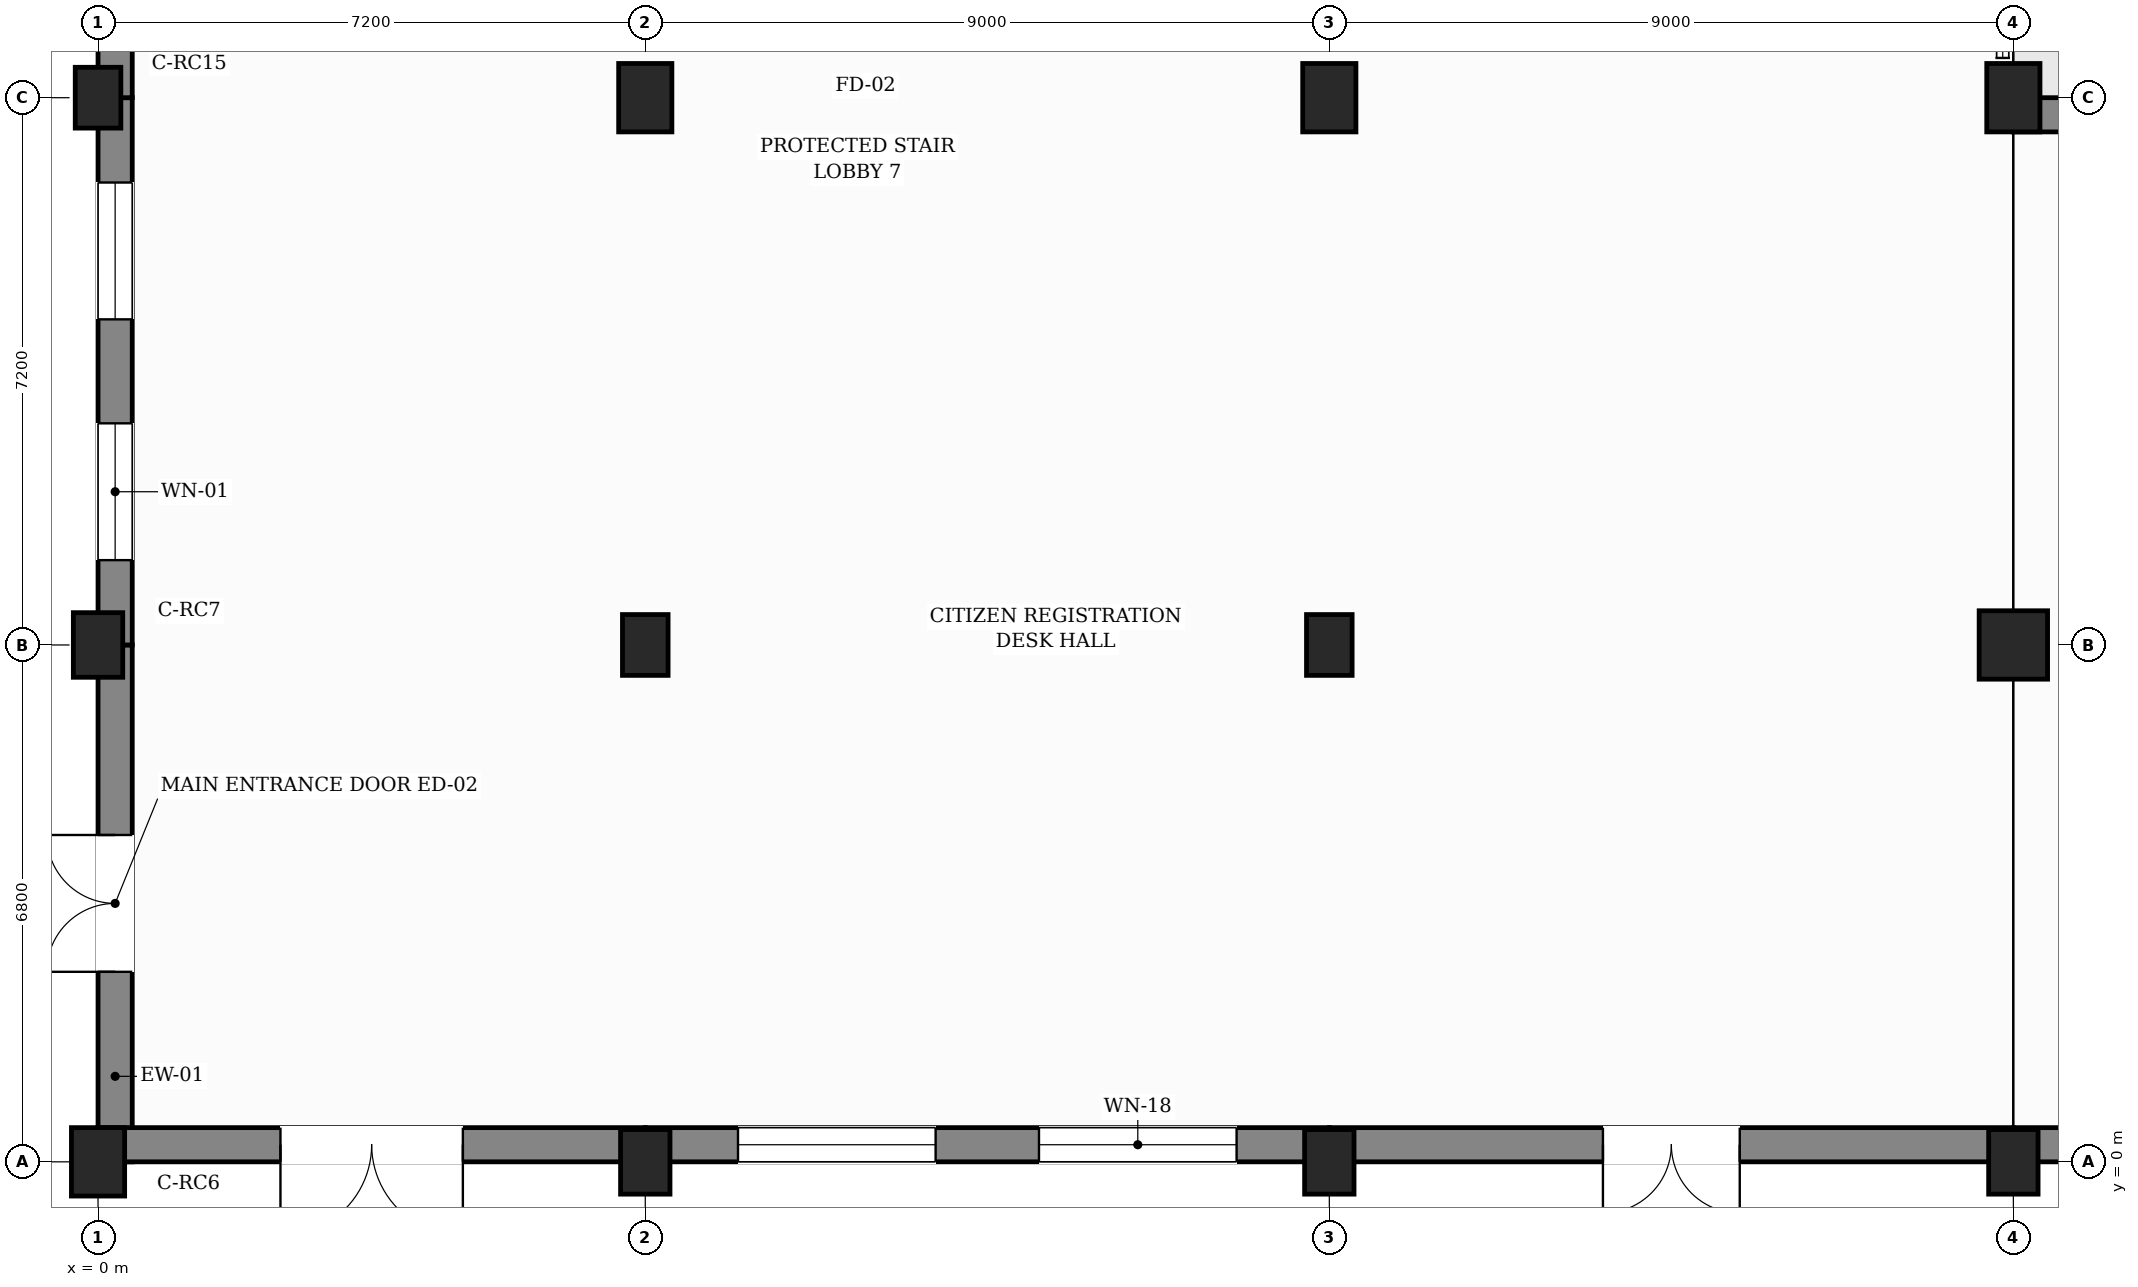
"""IFC4 building model, lengths in metres.
Left out: names, types, materials, properties, quantities, classifications, styles, units other than length and angle.
Written with IfcOpenShell. Run it as: python <this file> out.ifc"""

import sys

from ifc_helpers import new_model, si_unit, direction, frame, frame_2d, origin, origin_with_axes, origin_2d, place, context, subcontext, project, spatial, rectangle, extrude, element, fill, save


model = new_model("IFC4")
c1 = context("Model", 3, precision=1e-05, world=origin(), true_north=direction((0.0, 1.0)))
c2 = subcontext(c1, "Body", "Model", "MODEL_VIEW")
j1 = project(units=[si_unit("LENGTHUNIT", "METRE"), si_unit("PLANEANGLEUNIT", "RADIAN")], contexts=[c1])
p1 = place(None, origin())
s1 = spatial("IfcSite", under=j1, at=p1, CompositionType="ELEMENT")
p2 = place(p1, origin())
s2 = spatial("IfcBuilding", under=s1, at=p2, CompositionType="ELEMENT")
p3 = place(p2, origin())
s3 = spatial("IfcBuildingStorey", under=s2, at=p3, CompositionType="ELEMENT", Elevation=0.0)
p4 = place(p3, origin_with_axes())
e1 = element("IfcColumn", 1, at=p4, inside=s3, PredefinedType="COLUMN", context=c2, shape_type="SweptSolid", body=[
    extrude(rectangle(XDim=0.7, YDim=0.9, at=origin_2d()), origin(), (0.0, 0.0, 1.0), 5.1),
])
p5 = place(p3, frame((0.0, 6.8, 0.0), z_axis=(0.0, 0.0, 1.0), x_axis=(1.0, 0.0, 0.0)))
e2 = element("IfcColumn", 2, at=p5, inside=s3, PredefinedType="COLUMN", context=c2, shape_type="SweptSolid", body=[
    extrude(rectangle(XDim=0.65, YDim=0.85, at=origin_2d()), origin(), (0.0, 0.0, 1.0), 5.1),
])
p6 = place(p3, frame((0.0, 14.0, 0.0), z_axis=(0.0, 0.0, 1.0), x_axis=(1.0, 0.0, 0.0)))
e3 = element("IfcColumn", 3, at=p6, inside=s3, PredefinedType="COLUMN", context=c2, shape_type="SweptSolid", body=[
    extrude(rectangle(XDim=0.6, YDim=0.8, at=origin_2d()), origin(), (0.0, 0.0, 1.0), 5.1),
])
p7 = place(p3, frame((7.2, 0.0, 0.0), z_axis=(0.0, 0.0, 1.0), x_axis=(1.0, 0.0, 0.0)))
e4 = element("IfcColumn", 4, at=p7, inside=s3, PredefinedType="COLUMN", context=c2, shape_type="SweptSolid", body=[
    extrude(rectangle(XDim=0.65, YDim=0.85, at=origin_2d()), origin(), (0.0, 0.0, 1.0), 5.1),
])
p8 = place(p3, frame((7.2, 6.8, 0.0), z_axis=(0.0, 0.0, 1.0), x_axis=(1.0, 0.0, 0.0)))
e5 = element("IfcColumn", 5, at=p8, inside=s3, PredefinedType="COLUMN", context=c2, shape_type="SweptSolid", body=[
    extrude(rectangle(XDim=0.6, YDim=0.8, at=origin_2d()), origin(), (0.0, 0.0, 1.0), 5.1),
])
p9 = place(p3, frame((7.2, 14.0, 0.0), z_axis=(0.0, 0.0, 1.0), x_axis=(1.0, 0.0, 0.0)))
e6 = element("IfcColumn", 6, at=p9, inside=s3, PredefinedType="COLUMN", context=c2, shape_type="SweptSolid", body=[
    extrude(rectangle(XDim=0.7, YDim=0.9, at=origin_2d()), origin(), (0.0, 0.0, 1.0), 5.1),
])
p10 = place(p3, frame((16.2, 0.0, 0.0), z_axis=(0.0, 0.0, 1.0), x_axis=(1.0, 0.0, 0.0)))
e7 = element("IfcColumn", 7, at=p10, inside=s3, PredefinedType="COLUMN", context=c2, shape_type="SweptSolid", body=[
    extrude(rectangle(XDim=0.65, YDim=0.85, at=origin_2d()), origin(), (0.0, 0.0, 1.0), 5.1),
])
p11 = place(p3, frame((16.2, 6.8, 0.0), z_axis=(0.0, 0.0, 1.0), x_axis=(1.0, 0.0, 0.0)))
e8 = element("IfcColumn", 8, at=p11, inside=s3, PredefinedType="COLUMN", context=c2, shape_type="SweptSolid", body=[
    extrude(rectangle(XDim=0.6, YDim=0.8, at=origin_2d()), origin(), (0.0, 0.0, 1.0), 5.1),
])
p12 = place(p3, frame((16.2, 14.0, 0.0), z_axis=(0.0, 0.0, 1.0), x_axis=(1.0, 0.0, 0.0)))
e9 = element("IfcColumn", 9, at=p12, inside=s3, PredefinedType="COLUMN", context=c2, shape_type="SweptSolid", body=[
    extrude(rectangle(XDim=0.7, YDim=0.9, at=origin_2d()), origin(), (0.0, 0.0, 1.0), 5.1),
])
p13 = place(p3, frame((25.2, 0.0, 0.0), z_axis=(0.0, 0.0, 1.0), x_axis=(1.0, 0.0, 0.0)))
e10 = element("IfcColumn", 10, at=p13, inside=s3, PredefinedType="COLUMN", context=c2, shape_type="SweptSolid", body=[
    extrude(rectangle(XDim=0.65, YDim=0.85, at=origin_2d()), origin(), (0.0, 0.0, 1.0), 5.1),
])
p14 = place(p3, frame((25.2, 6.8, 0.0), z_axis=(0.0, 0.0, 1.0), x_axis=(1.0, 0.0, 0.0)))
e11 = element("IfcColumn", 11, at=p14, inside=s3, PredefinedType="COLUMN", context=c2, shape_type="SweptSolid", body=[
    extrude(rectangle(XDim=0.9, YDim=0.9, at=origin_2d()), origin(), (0.0, 0.0, 1.0), 5.1),
])
p15 = place(p3, frame((25.2, 14.0, 0.0), z_axis=(0.0, 0.0, 1.0), x_axis=(1.0, 0.0, 0.0)))
e12 = element("IfcColumn", 12, at=p15, inside=s3, PredefinedType="COLUMN", context=c2, shape_type="SweptSolid", body=[
    extrude(rectangle(XDim=0.7, YDim=0.9, at=origin_2d()), origin(), (0.0, 0.0, 1.0), 5.1),
])
p16 = place(p3, frame((0.225, 0.0, 0.0), z_axis=(0.0, 0.0, 1.0), x_axis=(0.0, 1.0, 0.0)))
e13 = element("IfcWall", 13, at=p16, inside=s3, PredefinedType="SOLIDWALL", context=c2, shape_type="SweptSolid", body=[
    extrude(rectangle(XDim=6.8, YDim=0.45, at=frame_2d((3.4, 0.0))), origin(), (0.0, 0.0, 1.0), 4.78),
])
p17 = place(p16, frame((2.5, 0.0, 0.0)))
e14 = element("IfcOpeningElement", 14, at=p17, cuts=e13, PredefinedType="OPENING", context=c2, shape_type="SweptSolid", body=[
    extrude(rectangle(XDim=1.8, YDim=2.4, at=frame_2d((0.9, 1.2))), frame((0.0, 0.235, 0.0), z_axis=(0.0, -1.0, 0.0), x_axis=(1.0, 0.0, 0.0)), (0.0, 0.0, 1.0), 0.47),
])
p18 = place(p3, frame((0.225, 6.8, 0.0), z_axis=(0.0, 0.0, 1.0), x_axis=(0.0, 1.0, 0.0)))
e15 = element("IfcWall", 15, at=p18, inside=s3, PredefinedType="SOLIDWALL", context=c2, shape_type="SweptSolid", body=[
    extrude(rectangle(XDim=7.2, YDim=0.45, at=frame_2d((3.6, 0.0))), origin(), (0.0, 0.0, 1.0), 4.78),
])
p19 = place(p18, frame((1.116, 0.0, 0.85)))
e16 = element("IfcOpeningElement", 16, at=p19, cuts=e15, PredefinedType="OPENING", context=c2, shape_type="SweptSolid", body=[
    extrude(rectangle(XDim=1.8, YDim=2.8, at=frame_2d((0.9, 1.4))), frame((0.0, 0.235, 0.0), z_axis=(0.0, -1.0, 0.0), x_axis=(1.0, 0.0, 0.0)), (0.0, 0.0, 1.0), 0.47),
])
p20 = place(p18, frame((4.284, 0.0, 0.85)))
e17 = element("IfcOpeningElement", 17, at=p20, cuts=e15, PredefinedType="OPENING", context=c2, shape_type="SweptSolid", body=[
    extrude(rectangle(XDim=1.8, YDim=2.8, at=frame_2d((0.9, 1.4))), frame((0.0, 0.235, 0.0), z_axis=(0.0, -1.0, 0.0), x_axis=(1.0, 0.0, 0.0)), (0.0, 0.0, 1.0), 0.47),
])
p21 = place(p3, frame((0.225, 14.0, 0.0), z_axis=(0.0, 0.0, 1.0), x_axis=(0.0, 1.0, 0.0)))
e18 = element("IfcWall", 18, at=p21, inside=s3, PredefinedType="SOLIDWALL", context=c2, shape_type="SweptSolid", body=[
    extrude(rectangle(XDim=9.0, YDim=0.45, at=frame_2d((4.5, 0.0))), origin(), (0.0, 0.0, 1.0), 4.78),
])
p22 = place(p21, frame((3.3, 0.0, 0.0)))
e19 = element("IfcOpeningElement", 19, at=p22, cuts=e18, PredefinedType="OPENING", context=c2, shape_type="SweptSolid", body=[
    extrude(rectangle(XDim=2.4, YDim=2.7, at=frame_2d((1.2, 1.35))), frame((0.0, 0.235, 0.0), z_axis=(0.0, -1.0, 0.0), x_axis=(1.0, 0.0, 0.0)), (0.0, 0.0, 1.0), 0.47),
])
p23 = place(p3, frame((32.4, 0.225, 0.0), z_axis=(0.0, 0.0, 1.0), x_axis=(-1.0, 0.0, 0.0)))
e20 = element("IfcWall", 20, at=p23, inside=s3, PredefinedType="SOLIDWALL", context=c2, shape_type="SweptSolid", body=[
    extrude(rectangle(XDim=7.2, YDim=0.45, at=frame_2d((3.6, 0.0))), origin(), (0.0, 0.0, 1.0), 4.78),
])
p24 = place(p23, frame((2.4, 0.0, 0.85)))
e21 = element("IfcOpeningElement", 21, at=p24, cuts=e20, PredefinedType="OPENING", context=c2, shape_type="SweptSolid", body=[
    extrude(rectangle(XDim=2.4, YDim=2.8, at=frame_2d((1.2, 1.4))), frame((0.0, 0.235, 0.0), z_axis=(0.0, -1.0, 0.0), x_axis=(1.0, 0.0, 0.0)), (0.0, 0.0, 1.0), 0.47),
])
p25 = place(p3, frame((25.2, 0.225, 0.0), z_axis=(0.0, 0.0, 1.0), x_axis=(-1.0, 0.0, 0.0)))
e22 = element("IfcWall", 22, at=p25, inside=s3, PredefinedType="SOLIDWALL", context=c2, shape_type="SweptSolid", body=[
    extrude(rectangle(XDim=9.0, YDim=0.45, at=frame_2d((4.5, 0.0))), origin(), (0.0, 0.0, 1.0), 4.78),
])
p26 = place(p25, frame((3.6, 0.0, 0.0)))
e23 = element("IfcOpeningElement", 23, at=p26, cuts=e22, PredefinedType="OPENING", context=c2, shape_type="SweptSolid", body=[
    extrude(rectangle(XDim=1.8, YDim=2.4, at=frame_2d((0.9, 1.2))), frame((0.0, 0.235, 0.0), z_axis=(0.0, -1.0, 0.0), x_axis=(1.0, 0.0, 0.0)), (0.0, 0.0, 1.0), 0.47),
])
p27 = place(p3, frame((16.2, 0.225, 0.0), z_axis=(0.0, 0.0, 1.0), x_axis=(-1.0, 0.0, 0.0)))
e24 = element("IfcWall", 24, at=p27, inside=s3, PredefinedType="SOLIDWALL", context=c2, shape_type="SweptSolid", body=[
    extrude(rectangle(XDim=9.0, YDim=0.45, at=frame_2d((4.5, 0.0))), origin(), (0.0, 0.0, 1.0), 4.78),
])
p28 = place(p27, frame((1.22, 0.0, 0.85)))
e25 = element("IfcOpeningElement", 25, at=p28, cuts=e24, PredefinedType="OPENING", context=c2, shape_type="SweptSolid", body=[
    extrude(rectangle(XDim=2.6, YDim=2.2, at=frame_2d((1.3, 1.1))), frame((0.0, 0.235, 0.0), z_axis=(0.0, -1.0, 0.0), x_axis=(1.0, 0.0, 0.0)), (0.0, 0.0, 1.0), 0.47),
])
p29 = place(p27, frame((5.18, 0.0, 0.85)))
e26 = element("IfcOpeningElement", 26, at=p29, cuts=e24, PredefinedType="OPENING", context=c2, shape_type="SweptSolid", body=[
    extrude(rectangle(XDim=2.6, YDim=2.2, at=frame_2d((1.3, 1.1))), frame((0.0, 0.235, 0.0), z_axis=(0.0, -1.0, 0.0), x_axis=(1.0, 0.0, 0.0)), (0.0, 0.0, 1.0), 0.47),
])
p30 = place(p3, frame((7.2, 0.225, 0.0), z_axis=(0.0, 0.0, 1.0), x_axis=(-1.0, 0.0, 0.0)))
e27 = element("IfcWall", 27, at=p30, inside=s3, PredefinedType="SOLIDWALL", context=c2, shape_type="SweptSolid", body=[
    extrude(rectangle(XDim=7.2, YDim=0.45, at=frame_2d((3.6, 0.0))), origin(), (0.0, 0.0, 1.0), 4.78),
])
p31 = place(p30, frame((2.4, 0.0, 0.0)))
e28 = element("IfcOpeningElement", 28, at=p31, cuts=e27, PredefinedType="OPENING", context=c2, shape_type="SweptSolid", body=[
    extrude(rectangle(XDim=2.4, YDim=2.7, at=frame_2d((1.2, 1.35))), frame((0.0, 0.235, 0.0), z_axis=(0.0, -1.0, 0.0), x_axis=(1.0, 0.0, 0.0)), (0.0, 0.0, 1.0), 0.47),
])
p32 = place(p3, frame((25.2, 13.775, 0.0), z_axis=(0.0, 0.0, 1.0), x_axis=(1.0, 0.0, 0.0)))
e29 = element("IfcWall", 29, at=p32, inside=s3, PredefinedType="SOLIDWALL", context=c2, shape_type="SweptSolid", body=[
    extrude(rectangle(XDim=7.2, YDim=0.45, at=frame_2d((3.6, 0.0))), origin(), (0.0, 0.0, 1.0), 4.78),
])
p33 = place(p32, frame((1.116, 0.0, 0.85)))
e30 = element("IfcOpeningElement", 30, at=p33, cuts=e29, PredefinedType="OPENING", context=c2, shape_type="SweptSolid", body=[
    extrude(rectangle(XDim=1.8, YDim=2.8, at=frame_2d((0.9, 1.4))), frame((0.0, 0.235, 0.0), z_axis=(0.0, -1.0, 0.0), x_axis=(1.0, 0.0, 0.0)), (0.0, 0.0, 1.0), 0.47),
])
p34 = place(p32, frame((4.284, 0.0, 0.85)))
e31 = element("IfcOpeningElement", 31, at=p34, cuts=e29, PredefinedType="OPENING", context=c2, shape_type="SweptSolid", body=[
    extrude(rectangle(XDim=1.8, YDim=2.8, at=frame_2d((0.9, 1.4))), frame((0.0, 0.235, 0.0), z_axis=(0.0, -1.0, 0.0), x_axis=(1.0, 0.0, 0.0)), (0.0, 0.0, 1.0), 0.47),
])
p35 = place(p17, origin())
e32 = element("IfcDoor", 32, at=p35, inside=s3, OperationType="DOUBLE_DOOR_SINGLE_SWING", PredefinedType="DOOR", context=c2, shape_type="SweptSolid", body=[
    extrude(rectangle(XDim=1.8, YDim=2.4, at=frame_2d((0.9, 1.2))), frame((0.0, 0.025, 0.0), z_axis=(0.0, -1.0, 0.0), x_axis=(1.0, 0.0, 0.0)), (0.0, 0.0, 1.0), 0.05),
])
fill(e14, e32)
p36 = place(p19, origin())
e33 = element("IfcWindow", 33, at=p36, inside=s3, PartitioningType="DOUBLE_PANEL_VERTICAL", PredefinedType="WINDOW", context=c2, shape_type="SweptSolid", body=[
    extrude(rectangle(XDim=1.8, YDim=2.8, at=frame_2d((0.9, 1.4))), frame((0.0, 0.03, 0.0), z_axis=(0.0, -1.0, 0.0), x_axis=(1.0, 0.0, 0.0)), (0.0, 0.0, 1.0), 0.06),
])
fill(e16, e33)
p37 = place(p20, origin())
e34 = element("IfcWindow", 34, at=p37, inside=s3, PartitioningType="DOUBLE_PANEL_VERTICAL", PredefinedType="WINDOW", context=c2, shape_type="SweptSolid", body=[
    extrude(rectangle(XDim=1.8, YDim=2.8, at=frame_2d((0.9, 1.4))), frame((0.0, 0.03, 0.0), z_axis=(0.0, -1.0, 0.0), x_axis=(1.0, 0.0, 0.0)), (0.0, 0.0, 1.0), 0.06),
])
fill(e17, e34)
p38 = place(p26, origin())
e35 = element("IfcDoor", 35, at=p38, inside=s3, OperationType="DOUBLE_DOOR_SINGLE_SWING", PredefinedType="DOOR", context=c2, shape_type="SweptSolid", body=[
    extrude(rectangle(XDim=1.8, YDim=2.4, at=frame_2d((0.9, 1.2))), frame((0.0, 0.025, 0.0), z_axis=(0.0, -1.0, 0.0), x_axis=(1.0, 0.0, 0.0)), (0.0, 0.0, 1.0), 0.05),
])
fill(e23, e35)
p39 = place(p28, origin())
e36 = element("IfcWindow", 36, at=p39, inside=s3, PartitioningType="TRIPLE_PANEL_VERTICAL", PredefinedType="WINDOW", context=c2, shape_type="SweptSolid", body=[
    extrude(rectangle(XDim=2.6, YDim=2.2, at=frame_2d((1.3, 1.1))), frame((0.0, 0.03, 0.0), z_axis=(0.0, -1.0, 0.0), x_axis=(1.0, 0.0, 0.0)), (0.0, 0.0, 1.0), 0.06),
])
fill(e25, e36)
p40 = place(p29, origin())
e37 = element("IfcWindow", 37, at=p40, inside=s3, PartitioningType="TRIPLE_PANEL_VERTICAL", PredefinedType="WINDOW", context=c2, shape_type="SweptSolid", body=[
    extrude(rectangle(XDim=2.6, YDim=2.2, at=frame_2d((1.3, 1.1))), frame((0.0, 0.03, 0.0), z_axis=(0.0, -1.0, 0.0), x_axis=(1.0, 0.0, 0.0)), (0.0, 0.0, 1.0), 0.06),
])
fill(e26, e37)
p41 = place(p31, origin())
e38 = element("IfcDoor", 38, at=p41, inside=s3, OperationType="DOUBLE_DOOR_SINGLE_SWING", PredefinedType="DOOR", context=c2, shape_type="SweptSolid", body=[
    extrude(rectangle(XDim=2.4, YDim=2.7, at=frame_2d((1.2, 1.35))), frame((0.0, 0.025, 0.0), z_axis=(0.0, -1.0, 0.0), x_axis=(1.0, 0.0, 0.0)), (0.0, 0.0, 1.0), 0.05),
])
fill(e28, e38)
save(model, sys.argv[1])
